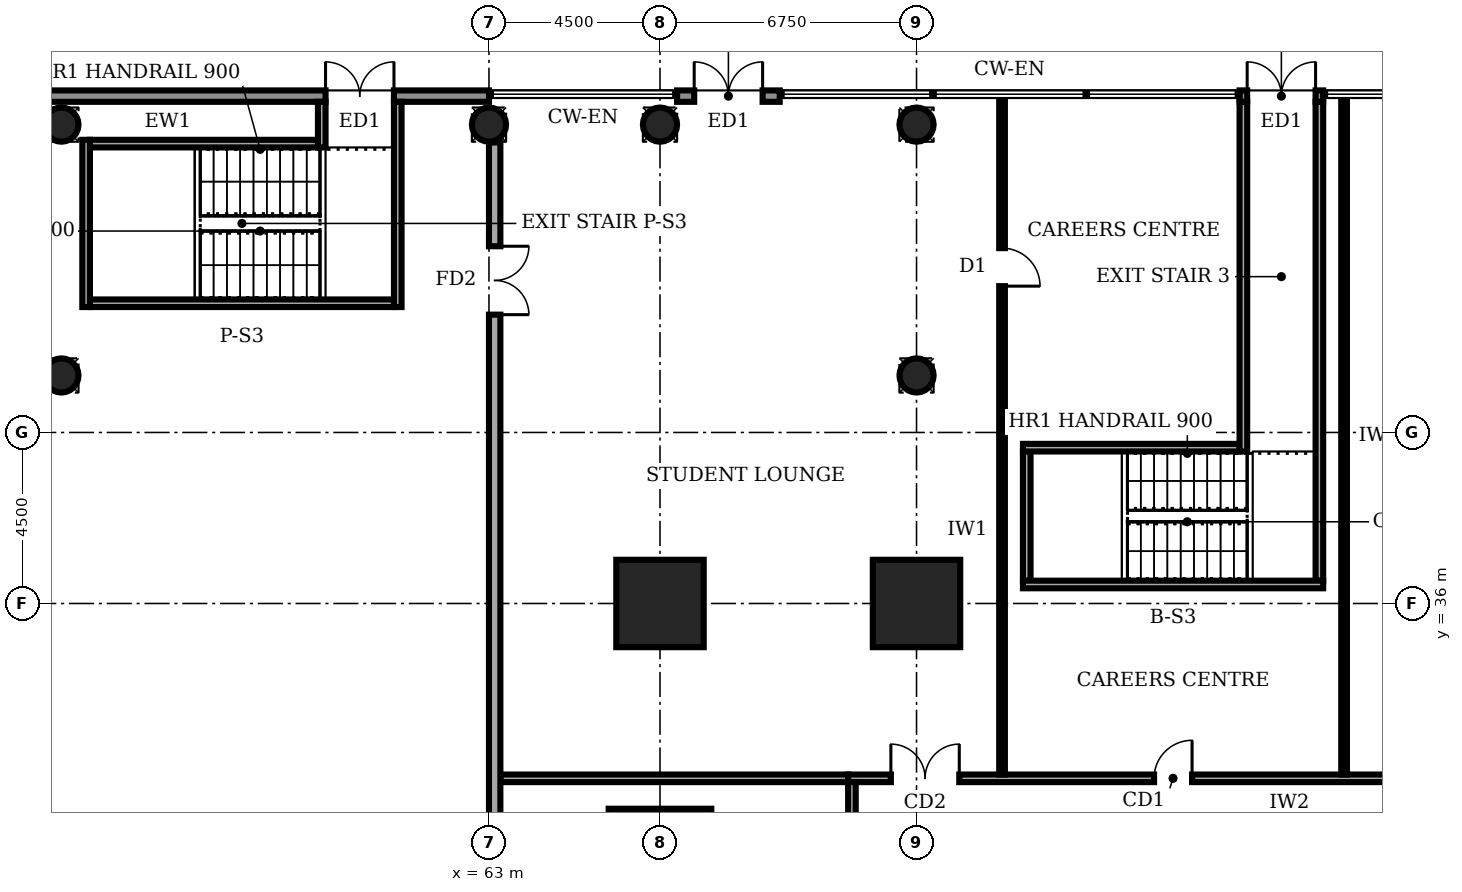
"""IFC4 building model, lengths in metres.
Left out: names, types, materials, properties, quantities, classifications, styles, units other than length and angle.
Written with IfcOpenShell. Run it as: python <this file> out.ifc"""

import sys

from ifc_helpers import new_model, si_unit, direction, frame, frame_2d, origin, origin_2d, place, context, subcontext, project, spatial, rectangle, circle, extrude, element, fill, save


model = new_model("IFC4")
c1 = context("Model", 3, precision=1e-05, world=origin(), true_north=direction((0.0, 1.0)))
c2 = subcontext(c1, "Body", "Model", "MODEL_VIEW")
j1 = project(units=[si_unit("LENGTHUNIT", "METRE"), si_unit("PLANEANGLEUNIT", "RADIAN")], contexts=[c1])
p1 = place(None, origin())
s1 = spatial("IfcSite", under=j1, at=p1, CompositionType="ELEMENT")
p2 = place(p1, origin())
s2 = spatial("IfcBuilding", under=s1, at=p2, CompositionType="ELEMENT")
p3 = place(p2, origin())
s3 = spatial("IfcBuildingStorey", under=s2, at=p3, CompositionType="ELEMENT", Elevation=0.0)
p4 = place(p3, frame((67.5, 29.25, -0.4), z_axis=(0.0, 0.0, 1.0), x_axis=(1.0, 0.0, 0.0)))
e1 = element("IfcColumn", 1, at=p4, inside=s3, PredefinedType="COLUMN", context=c2, shape_type="SweptSolid", body=[
    extrude(rectangle(XDim=2.7, YDim=2.7, at=origin_2d()), origin(), (0.0, 0.0, 1.0), 6.4),
])
for number, where, z_axis, x_axis in (
    (2, (67.5, 36.0, -0.4), (0.0, 0.0, 1.0), (1.0, 0.0, 0.0)),
    (3, (74.25, 36.0, -0.4), (0.0, 0.0, 1.0), (1.0, 0.0, 0.0)),
):
    element("IfcColumn", number, at=place(p3, frame(where, z_axis=z_axis, x_axis=x_axis)), inside=s3, PredefinedType="COLUMN", context=c2, shape_type="SweptSolid", body=[
        extrude(rectangle(XDim=2.3, YDim=2.3, at=origin_2d()), origin(), (0.0, 0.0, 1.0), 6.4),
    ])
for number, where, z_axis, x_axis in (
    (4, (51.75, 42.0, -0.4), (0.0, 0.0, 1.0), (1.0, 0.0, 0.0)),
    (5, (74.25, 42.0, -0.4), (0.0, 0.0, 1.0), (1.0, 0.0, 0.0)),
    (6, (51.75, 48.6, -0.4), (0.0, 0.0, 1.0), (1.0, 0.0, 0.0)),
    (7, (63.0, 48.6, -0.4), (0.0, 0.0, 1.0), (1.0, 0.0, 0.0)),
    (8, (67.5, 48.6, -0.4), (0.0, 0.0, 1.0), (1.0, 0.0, 0.0)),
    (9, (74.25, 48.6, -0.4), (0.0, 0.0, 1.0), (1.0, 0.0, 0.0)),
):
    element("IfcColumn", number, at=place(p3, frame(where, z_axis=z_axis, x_axis=x_axis)), inside=s3, PredefinedType="COLUMN", context=c2, shape_type="SweptSolid", body=[
        extrude(circle(Radius=0.45, at=origin_2d()), origin(), (0.0, 0.0, 1.0), 6.4),
    ])
p5 = place(p3, frame((63.0, 49.35, 0.0), z_axis=(0.0, 0.0, 1.0), x_axis=(-1.0, 0.0, 0.0)))
e10 = element("IfcWall", 10, at=p5, inside=s3, PredefinedType="STANDARD", context=c2, shape_type="SweptSolid", body=[
    extrude(rectangle(XDim=22.5, YDim=0.3, at=frame_2d((11.25, 0.0))), origin(), (0.0, 0.0, 1.0), 5.7),
])
p6 = place(p5, frame((17.1, 0.0, 0.0)))
e11 = element("IfcOpeningElement", 11, at=p6, cuts=e10, PredefinedType="OPENING", context=c2, shape_type="SweptSolid", body=[
    extrude(rectangle(XDim=1.8, YDim=2.4, at=frame_2d((0.9, 1.2))), frame((0.0, 0.16, 0.0), z_axis=(0.0, -1.0, 0.0), x_axis=(1.0, 0.0, 0.0)), (0.0, 0.0, 1.0), 0.32),
])
p7 = place(p5, frame((12.6, 0.0, 0.0)))
e12 = element("IfcOpeningElement", 12, at=p7, cuts=e10, PredefinedType="OPENING", context=c2, shape_type="SweptSolid", body=[
    extrude(rectangle(XDim=1.8, YDim=2.4, at=frame_2d((0.9, 1.2))), frame((0.0, 0.16, 0.0), z_axis=(0.0, -1.0, 0.0), x_axis=(1.0, 0.0, 0.0)), (0.0, 0.0, 1.0), 0.32),
])
p8 = place(p5, frame((2.5, 0.0, 0.0)))
e13 = element("IfcOpeningElement", 13, at=p8, cuts=e10, PredefinedType="OPENING", context=c2, shape_type="SweptSolid", body=[
    extrude(rectangle(XDim=1.8, YDim=2.4, at=frame_2d((0.9, 1.2))), frame((0.0, 0.16, 0.0), z_axis=(0.0, -1.0, 0.0), x_axis=(1.0, 0.0, 0.0)), (0.0, 0.0, 1.0), 0.32),
])
p9 = place(p3, frame((70.65, 49.35, 0.0), z_axis=(0.0, 0.0, 1.0), x_axis=(-1.0, 0.0, 0.0)))
e14 = element("IfcWall", 14, at=p9, inside=s3, PredefinedType="STANDARD", context=c2, shape_type="SweptSolid", body=[
    extrude(rectangle(XDim=2.7, YDim=0.3, at=frame_2d((1.35, 0.0))), origin(), (0.0, 0.0, 1.0), 5.7),
])
p10 = place(p9, frame((0.45, 0.0, 0.0)))
e15 = element("IfcOpeningElement", 15, at=p10, cuts=e14, PredefinedType="OPENING", context=c2, shape_type="SweptSolid", body=[
    extrude(rectangle(XDim=1.8, YDim=2.4, at=frame_2d((0.9, 1.2))), frame((0.0, 0.16, 0.0), z_axis=(0.0, -1.0, 0.0), x_axis=(1.0, 0.0, 0.0)), (0.0, 0.0, 1.0), 0.32),
])
p11 = place(p3, frame((84.95, 49.35, 0.0), z_axis=(0.0, 0.0, 1.0), x_axis=(-1.0, 0.0, 0.0)))
e16 = element("IfcWall", 16, at=p11, inside=s3, PredefinedType="STANDARD", context=c2, shape_type="SweptSolid", body=[
    extrude(rectangle(XDim=2.2, YDim=0.3, at=frame_2d((1.1, 0.0))), origin(), (0.0, 0.0, 1.0), 5.7),
])
p12 = place(p11, frame((0.2, 0.0, 0.0)))
e17 = element("IfcOpeningElement", 17, at=p12, cuts=e16, PredefinedType="OPENING", context=c2, shape_type="SweptSolid", body=[
    extrude(rectangle(XDim=1.8, YDim=2.4, at=frame_2d((0.9, 1.2))), frame((0.0, 0.16, 0.0), z_axis=(0.0, -1.0, 0.0), x_axis=(1.0, 0.0, 0.0)), (0.0, 0.0, 1.0), 0.32),
])
p13 = place(p3, frame((89.35, 31.4, 0.0), z_axis=(0.0, 0.0, 1.0), x_axis=(-1.0, 0.0, 0.0)))
e18 = element("IfcWall", 18, at=p13, inside=s3, PredefinedType="SOLIDWALL", context=c2, shape_type="SweptSolid", body=[
    extrude(rectangle(XDim=16.9, YDim=0.2, at=frame_2d((8.45, 0.0))), origin(), (0.0, 0.0, 1.0), 5.7),
])
p14 = place(p13, frame((13.975, 0.0, 0.0)))
e19 = element("IfcOpeningElement", 19, at=p14, cuts=e18, PredefinedType="OPENING", context=c2, shape_type="SweptSolid", body=[
    extrude(rectangle(XDim=1.8, YDim=2.1, at=frame_2d((0.9, 1.05))), frame((0.0, 0.11, 0.0), z_axis=(0.0, -1.0, 0.0), x_axis=(1.0, 0.0, 0.0)), (0.0, 0.0, 1.0), 0.22),
])
p15 = place(p13, frame((7.85, 0.0, 0.0)))
e20 = element("IfcOpeningElement", 20, at=p15, cuts=e18, PredefinedType="OPENING", context=c2, shape_type="SweptSolid", body=[
    extrude(rectangle(XDim=1.0, YDim=2.1, at=frame_2d((0.5, 1.05))), frame((0.0, 0.11, 0.0), z_axis=(0.0, -1.0, 0.0), x_axis=(1.0, 0.0, 0.0)), (0.0, 0.0, 1.0), 0.22),
])
p16 = place(p13, frame((0.925, 0.0, 0.0)))
e21 = element("IfcOpeningElement", 21, at=p16, cuts=e18, PredefinedType="OPENING", context=c2, shape_type="SweptSolid", body=[
    extrude(rectangle(XDim=1.8, YDim=2.1, at=frame_2d((0.9, 1.05))), frame((0.0, 0.11, 0.0), z_axis=(0.0, -1.0, 0.0), x_axis=(1.0, 0.0, 0.0)), (0.0, 0.0, 1.0), 0.22),
])
p17 = place(p3, frame((72.55, 31.3, 0.0), z_axis=(0.0, 0.0, 1.0), x_axis=(0.0, -1.0, 0.0)))
e22 = element("IfcWall", 22, at=p17, inside=s3, PredefinedType="SOLIDWALL", context=c2, shape_type="SweptSolid", body=[
    extrude(rectangle(XDim=22.3, YDim=0.2, at=frame_2d((11.15, 0.0))), origin(), (0.0, 0.0, 1.0), 5.7),
])
p18 = place(p17, frame((19.55, 0.0, 0.0)))
e23 = element("IfcOpeningElement", 23, at=p18, cuts=e22, PredefinedType="OPENING", context=c2, shape_type="SweptSolid", body=[
    extrude(rectangle(XDim=1.0, YDim=2.1, at=frame_2d((0.5, 1.05))), frame((0.0, 0.11, 0.0), z_axis=(0.0, -1.0, 0.0), x_axis=(1.0, 0.0, 0.0)), (0.0, 0.0, 1.0), 0.22),
])
p19 = place(p17, frame((10.15, 0.0, 0.0)))
e24 = element("IfcOpeningElement", 24, at=p19, cuts=e22, PredefinedType="OPENING", context=c2, shape_type="SweptSolid", body=[
    extrude(rectangle(XDim=1.8, YDim=2.1, at=frame_2d((0.9, 1.05))), frame((0.0, 0.11, 0.0), z_axis=(0.0, -1.0, 0.0), x_axis=(1.0, 0.0, 0.0)), (0.0, 0.0, 1.0), 0.22),
])
p20 = place(p17, frame((1.55, 0.0, 0.0)))
e25 = element("IfcOpeningElement", 25, at=p20, cuts=e22, PredefinedType="OPENING", context=c2, shape_type="SweptSolid", body=[
    extrude(rectangle(XDim=1.0, YDim=2.1, at=frame_2d((0.5, 1.05))), frame((0.0, 0.11, 0.0), z_axis=(0.0, -1.0, 0.0), x_axis=(1.0, 0.0, 0.0)), (0.0, 0.0, 1.0), 0.22),
])
p21 = place(p3, frame((63.3, 31.4, 0.0), z_axis=(0.0, 0.0, 1.0), x_axis=(1.0, 0.0, 0.0)))
e26 = element("IfcWall", 26, at=p21, inside=s3, PredefinedType="SOLIDWALL", context=c2, shape_type="SweptSolid", body=[
    extrude(rectangle(XDim=9.15, YDim=0.2, at=frame_2d((4.575, 0.0))), origin(), (0.0, 0.0, 1.0), 5.7),
])
p22 = place(p3, frame((76.5, 31.5, 0.0), z_axis=(0.0, 0.0, 1.0), x_axis=(0.0, 1.0, 0.0)))
e27 = element("IfcWall", 27, at=p22, inside=s3, PredefinedType="PARTITIONING", context=c2, shape_type="SweptSolid", body=[
    extrude(rectangle(XDim=17.82, YDim=0.15, at=frame_2d((8.91, 0.0))), origin(), (0.0, 0.0, 1.0), 5.7),
])
p23 = place(p22, frame((12.85, 0.0, 0.0)))
e28 = element("IfcOpeningElement", 28, at=p23, cuts=e27, PredefinedType="OPENING", context=c2, shape_type="SweptSolid", body=[
    extrude(rectangle(XDim=1.0, YDim=2.1, at=frame_2d((0.5, 1.05))), frame((0.0, 0.085, 0.0), z_axis=(0.0, -1.0, 0.0), x_axis=(1.0, 0.0, 0.0)), (0.0, 0.0, 1.0), 0.17),
])
p24 = place(p3, frame((85.5, 31.5, 0.0), z_axis=(0.0, 0.0, 1.0), x_axis=(0.0, 1.0, 0.0)))
e29 = element("IfcWall", 29, at=p24, inside=s3, PredefinedType="PARTITIONING", context=c2, shape_type="SweptSolid", body=[
    extrude(rectangle(XDim=17.82, YDim=0.15, at=frame_2d((8.91, 0.0))), origin(), (0.0, 0.0, 1.0), 5.7),
])
p25 = place(p3, frame((52.5, 43.9, 0.0), z_axis=(0.0, 0.0, 1.0), x_axis=(1.0, 0.0, 0.0)))
e30 = element("IfcWall", 30, at=p25, inside=s3, PredefinedType="SOLIDWALL", context=c2, shape_type="SweptSolid", body=[
    extrude(rectangle(XDim=8.0, YDim=0.2, at=frame_2d((4.0, 0.0))), origin(), (0.0, 0.0, 1.0), 5.7),
])
p26 = place(p3, frame((52.5, 48.1, 0.0), z_axis=(0.0, 0.0, 1.0), x_axis=(1.0, 0.0, 0.0)))
e31 = element("IfcWall", 31, at=p26, inside=s3, PredefinedType="SOLIDWALL", context=c2, shape_type="SweptSolid", body=[
    extrude(rectangle(XDim=6.0, YDim=0.2, at=frame_2d((3.0, 0.0))), origin(), (0.0, 0.0, 1.0), 5.7),
])
p27 = place(p3, frame((58.6, 48.0, 0.0), z_axis=(0.0, 0.0, 1.0), x_axis=(0.0, 1.0, 0.0)))
e32 = element("IfcWall", 32, at=p27, inside=s3, PredefinedType="SOLIDWALL", context=c2, shape_type="SweptSolid", body=[
    extrude(rectangle(XDim=1.2, YDim=0.2, at=frame_2d((0.6, 0.0))), origin(), (0.0, 0.0, 1.0), 5.7),
])
p28 = place(p3, frame((52.4, 43.8, 0.0), z_axis=(0.0, 0.0, 1.0), x_axis=(0.0, 1.0, 0.0)))
e33 = element("IfcWall", 33, at=p28, inside=s3, PredefinedType="SOLIDWALL", context=c2, shape_type="SweptSolid", body=[
    extrude(rectangle(XDim=4.4, YDim=0.2, at=frame_2d((2.2, 0.0))), origin(), (0.0, 0.0, 1.0), 5.7),
])
p29 = place(p3, frame((60.6, 43.8, 0.0), z_axis=(0.0, 0.0, 1.0), x_axis=(0.0, 1.0, 0.0)))
e34 = element("IfcWall", 34, at=p29, inside=s3, PredefinedType="SOLIDWALL", context=c2, shape_type="SweptSolid", body=[
    extrude(rectangle(XDim=5.4, YDim=0.2, at=frame_2d((2.7, 0.0))), origin(), (0.0, 0.0, 1.0), 5.7),
])
p30 = place(p3, frame((77.05, 36.5, 0.0), z_axis=(0.0, 0.0, 1.0), x_axis=(1.0, 0.0, 0.0)))
e35 = element("IfcWall", 35, at=p30, inside=s3, PredefinedType="SOLIDWALL", context=c2, shape_type="SweptSolid", body=[
    extrude(rectangle(XDim=7.9, YDim=0.2, at=frame_2d((3.95, 0.0))), origin(), (0.0, 0.0, 1.0), 5.7),
])
p31 = place(p3, frame((77.05, 40.1, 0.0), z_axis=(0.0, 0.0, 1.0), x_axis=(1.0, 0.0, 0.0)))
e36 = element("IfcWall", 36, at=p31, inside=s3, PredefinedType="SOLIDWALL", context=c2, shape_type="SweptSolid", body=[
    extrude(rectangle(XDim=5.7, YDim=0.2, at=frame_2d((2.85, 0.0))), origin(), (0.0, 0.0, 1.0), 5.7),
])
p32 = place(p3, frame((77.15, 36.6, 0.0), z_axis=(0.0, 0.0, 1.0), x_axis=(0.0, 1.0, 0.0)))
e37 = element("IfcWall", 37, at=p32, inside=s3, PredefinedType="SOLIDWALL", context=c2, shape_type="SweptSolid", body=[
    extrude(rectangle(XDim=3.4, YDim=0.2, at=frame_2d((1.7, 0.0))), origin(), (0.0, 0.0, 1.0), 5.7),
])
p33 = place(p3, frame((84.85, 36.6, 0.0), z_axis=(0.0, 0.0, 1.0), x_axis=(0.0, 1.0, 0.0)))
e38 = element("IfcWall", 38, at=p33, inside=s3, PredefinedType="SOLIDWALL", context=c2, shape_type="SweptSolid", body=[
    extrude(rectangle(XDim=12.6, YDim=0.2, at=frame_2d((6.3, 0.0))), origin(), (0.0, 0.0, 1.0), 5.7),
])
p34 = place(p3, frame((82.85, 40.0, 0.0), z_axis=(0.0, 0.0, 1.0), x_axis=(0.0, 1.0, 0.0)))
e39 = element("IfcWall", 39, at=p34, inside=s3, PredefinedType="SOLIDWALL", context=c2, shape_type="SweptSolid", body=[
    extrude(rectangle(XDim=9.2, YDim=0.2, at=frame_2d((4.6, 0.0))), origin(), (0.0, 0.0, 1.0), 5.7),
])
p35 = place(p3, frame((63.15, 4.97, 0.0), z_axis=(0.0, 0.0, 1.0), x_axis=(0.0, 1.0, 0.0)))
e40 = element("IfcWall", 40, at=p35, inside=s3, PredefinedType="SOLIDWALL", context=c2, shape_type="SweptSolid", body=[
    extrude(rectangle(XDim=43.16, YDim=0.3, at=frame_2d((21.58, 0.0))), origin(), (0.0, 0.0, 1.0), 5.7),
])
p36 = place(p35, frame((9.88, 0.0, 0.0)))
e41 = element("IfcOpeningElement", 41, at=p36, cuts=e40, PredefinedType="OPENING", context=c2, shape_type="SweptSolid", body=[
    extrude(rectangle(XDim=1.8, YDim=2.1, at=frame_2d((0.9, 1.05))), frame((0.0, 0.16, 0.0), z_axis=(0.0, -1.0, 0.0), x_axis=(1.0, 0.0, 0.0)), (0.0, 0.0, 1.0), 0.32),
])
p37 = place(p35, frame((38.63, 0.0, 0.0)))
e42 = element("IfcOpeningElement", 42, at=p37, cuts=e40, PredefinedType="OPENING", context=c2, shape_type="SweptSolid", body=[
    extrude(rectangle(XDim=1.8, YDim=2.1, at=frame_2d((0.9, 1.05))), frame((0.0, 0.16, 0.0), z_axis=(0.0, -1.0, 0.0), x_axis=(1.0, 0.0, 0.0)), (0.0, 0.0, 1.0), 0.32),
])
p38 = place(p8, frame((1.8, 0.0, 0.0), z_axis=(0.0, 0.0, 1.0), x_axis=(-1.0, 0.0, 0.0)))
e43 = element("IfcDoor", 43, at=p38, inside=s3, OperationType="DOUBLE_DOOR_SINGLE_SWING", PredefinedType="DOOR", context=c2, shape_type="SweptSolid", body=[
    extrude(rectangle(XDim=1.8, YDim=2.4, at=frame_2d((0.9, 1.2))), frame((0.0, 0.025, 0.0), z_axis=(0.0, -1.0, 0.0), x_axis=(1.0, 0.0, 0.0)), (0.0, 0.0, 1.0), 0.05),
])
fill(e13, e43)
p39 = place(p10, frame((1.8, 0.0, 0.0), z_axis=(0.0, 0.0, 1.0), x_axis=(-1.0, 0.0, 0.0)))
e44 = element("IfcDoor", 44, at=p39, inside=s3, OperationType="DOUBLE_DOOR_SINGLE_SWING", PredefinedType="DOOR", context=c2, shape_type="SweptSolid", body=[
    extrude(rectangle(XDim=1.8, YDim=2.4, at=frame_2d((0.9, 1.2))), frame((0.0, 0.025, 0.0), z_axis=(0.0, -1.0, 0.0), x_axis=(1.0, 0.0, 0.0)), (0.0, 0.0, 1.0), 0.05),
])
fill(e15, e44)
p40 = place(p12, frame((1.8, 0.0, 0.0), z_axis=(0.0, 0.0, 1.0), x_axis=(-1.0, 0.0, 0.0)))
e45 = element("IfcDoor", 45, at=p40, inside=s3, OperationType="DOUBLE_DOOR_SINGLE_SWING", PredefinedType="DOOR", context=c2, shape_type="SweptSolid", body=[
    extrude(rectangle(XDim=1.8, YDim=2.4, at=frame_2d((0.9, 1.2))), frame((0.0, 0.025, 0.0), z_axis=(0.0, -1.0, 0.0), x_axis=(1.0, 0.0, 0.0)), (0.0, 0.0, 1.0), 0.05),
])
fill(e17, e45)
p41 = place(p14, frame((1.8, 0.0, 0.0), z_axis=(0.0, 0.0, 1.0), x_axis=(-1.0, 0.0, 0.0)))
e46 = element("IfcDoor", 46, at=p41, inside=s3, OperationType="DOUBLE_DOOR_SINGLE_SWING", PredefinedType="DOOR", context=c2, shape_type="SweptSolid", body=[
    extrude(rectangle(XDim=1.8, YDim=2.1, at=frame_2d((0.9, 1.05))), frame((0.0, 0.025, 0.0), z_axis=(0.0, -1.0, 0.0), x_axis=(1.0, 0.0, 0.0)), (0.0, 0.0, 1.0), 0.05),
])
fill(e19, e46)
p42 = place(p15, frame((1.0, 0.0, 0.0), z_axis=(0.0, 0.0, 1.0), x_axis=(-1.0, 0.0, 0.0)))
e47 = element("IfcDoor", 47, at=p42, inside=s3, OperationType="SINGLE_SWING_RIGHT", PredefinedType="DOOR", context=c2, shape_type="SweptSolid", body=[
    extrude(rectangle(XDim=1.0, YDim=2.1, at=frame_2d((0.5, 1.05))), frame((0.0, 0.025, 0.0), z_axis=(0.0, -1.0, 0.0), x_axis=(1.0, 0.0, 0.0)), (0.0, 0.0, 1.0), 0.05),
])
fill(e20, e47)
p43 = place(p23, frame((1.0, 0.0, 0.0), z_axis=(0.0, 0.0, 1.0), x_axis=(-1.0, 0.0, 0.0)))
e48 = element("IfcDoor", 48, at=p43, inside=s3, OperationType="SINGLE_SWING_RIGHT", PredefinedType="DOOR", context=c2, shape_type="SweptSolid", body=[
    extrude(rectangle(XDim=1.0, YDim=2.1, at=frame_2d((0.5, 1.05))), frame((0.0, 0.025, 0.0), z_axis=(0.0, -1.0, 0.0), x_axis=(1.0, 0.0, 0.0)), (0.0, 0.0, 1.0), 0.05),
])
fill(e28, e48)
p44 = place(p37, frame((1.8, 0.0, 0.0), z_axis=(0.0, 0.0, 1.0), x_axis=(-1.0, 0.0, 0.0)))
e49 = element("IfcDoor", 49, at=p44, inside=s3, OperationType="DOUBLE_DOOR_SINGLE_SWING", PredefinedType="DOOR", context=c2, shape_type="SweptSolid", body=[
    extrude(rectangle(XDim=1.8, YDim=2.1, at=frame_2d((0.9, 1.05))), frame((0.0, 0.025, 0.0), z_axis=(0.0, -1.0, 0.0), x_axis=(1.0, 0.0, 0.0)), (0.0, 0.0, 1.0), 0.05),
])
fill(e42, e49)
save(model, sys.argv[1])
